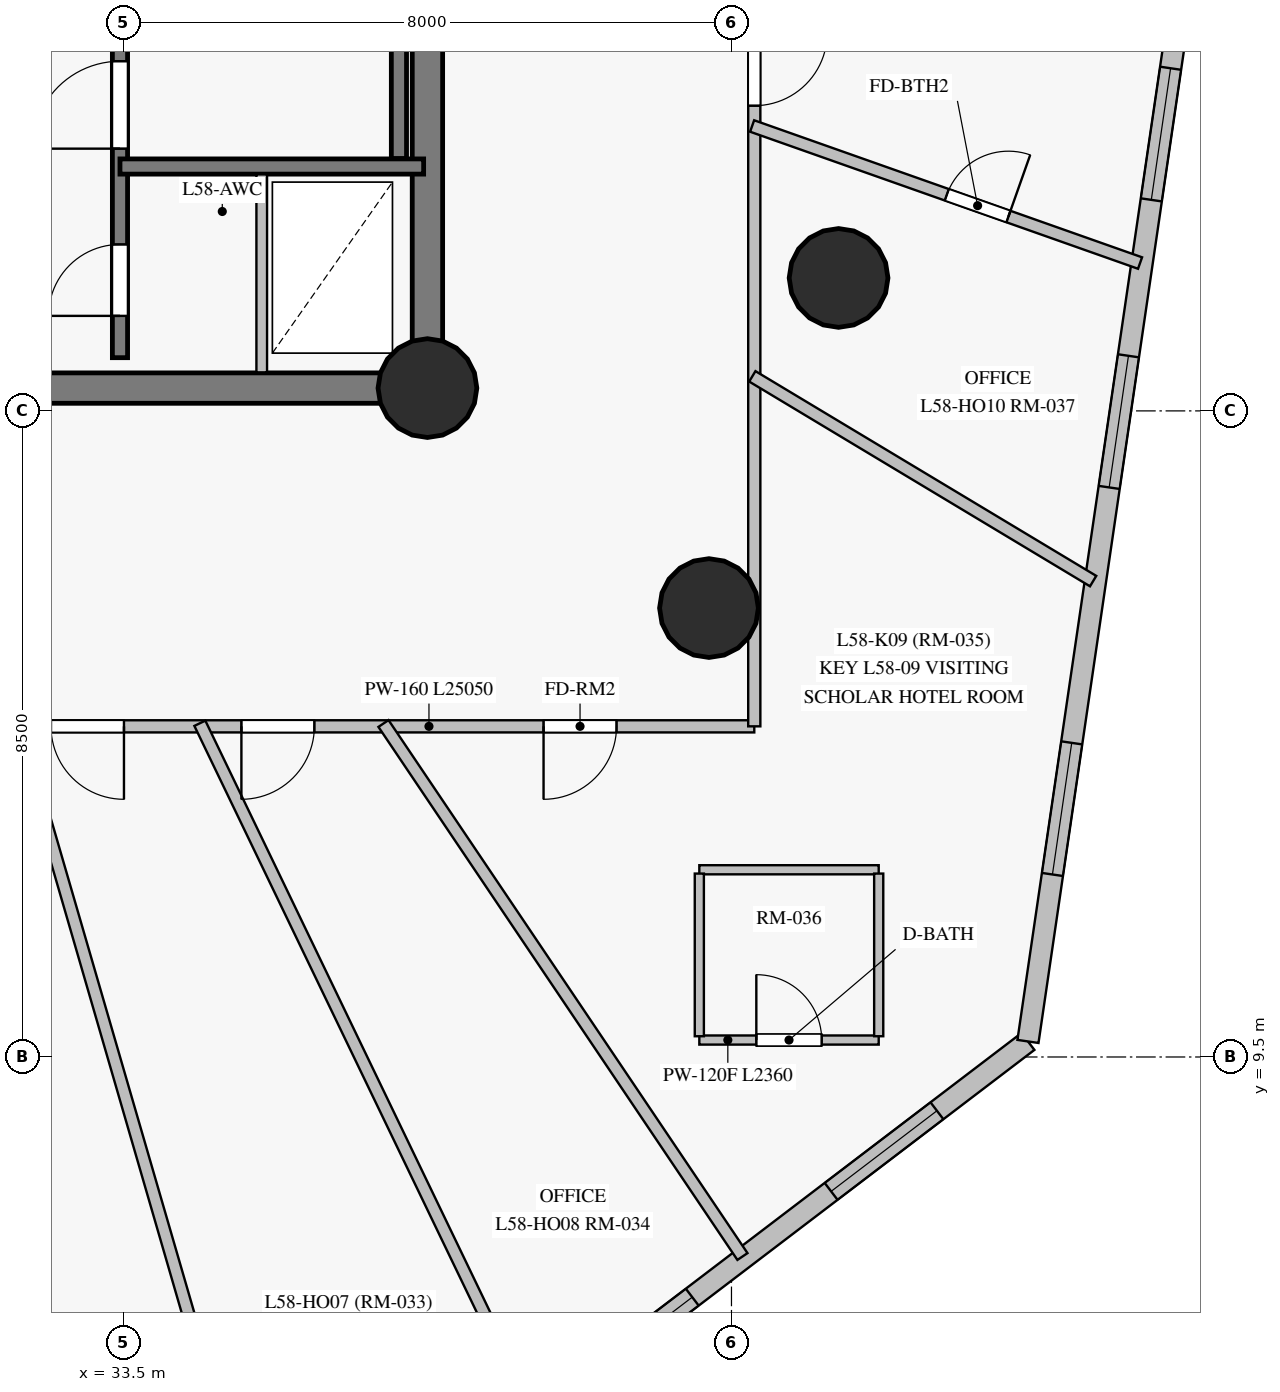
"""IFC4 building model, lengths in metres.
Left out: names, types, materials, properties, quantities, classifications, styles, units other than length and angle.
Written with IfcOpenShell. Run it as: python <this file> out.ifc"""

import sys

from ifc_helpers import new_model, si_unit, direction, frame, frame_2d, origin, origin_with_axes, origin_2d, place, context, subcontext, project, spatial, rectangle, circle, extrude, source, transform, mapped, element, fill, save


model = new_model("IFC4")
c1 = context("Model", 3, precision=1e-05, world=origin(), true_north=direction((0.0, 1.0)))
c2 = subcontext(c1, "Body", "Model", "MODEL_VIEW")
j1 = project(units=[si_unit("LENGTHUNIT", "METRE"), si_unit("PLANEANGLEUNIT", "RADIAN")], contexts=[c1])
p1 = place(None, origin())
s1 = spatial("IfcSite", under=j1, at=p1, CompositionType="ELEMENT")
p2 = place(p1, origin())
s2 = spatial("IfcBuilding", under=s1, at=p2, CompositionType="ELEMENT")
p3 = place(p2, frame((0.0, 0.0, 199.25)))
s3 = spatial("IfcBuildingStorey", under=s2, at=p3, CompositionType="ELEMENT", Elevation=199.25)
p4 = place(p3, frame((26.55, 18.3, 0.0), z_axis=(0.0, 0.0, 1.0), x_axis=(1.0, 0.0, 0.0)))
e1 = element("IfcWall", 1, at=p4, inside=s3, PredefinedType="SHEAR", context=c2, shape_type="SweptSolid", body=[
    extrude(rectangle(XDim=10.95, YDim=0.4, at=frame_2d((5.475, 0.0))), origin(), (0.0, 0.0, 1.0), 2.825),
])
p5 = place(p4, frame((4.55, 0.0, 0.0)))
e2 = element("IfcOpeningElement", 2, at=p5, cuts=e1, PredefinedType="OPENING", context=c2, shape_type="SweptSolid", body=[
    extrude(rectangle(XDim=1.4, YDim=2.2, at=frame_2d((0.7, 1.1))), frame((0.0, 0.21, 0.0), z_axis=(0.0, -1.0, 0.0), x_axis=(1.0, 0.0, 0.0)), (0.0, 0.0, 1.0), 0.42),
])
p6 = place(p3, frame((37.5, 18.3, 0.0), z_axis=(0.0, 0.0, 1.0), x_axis=(0.0, 1.0, 0.0)))
e3 = element("IfcWall", 3, at=p6, inside=s3, PredefinedType="SHEAR", context=c2, shape_type="SweptSolid", body=[
    extrude(rectangle(XDim=16.4, YDim=0.4, at=frame_2d((8.2, 0.0))), origin(), (0.0, 0.0, 1.0), 2.825),
])
p7 = place(p6, frame((13.85, 0.0, 0.0)))
e4 = element("IfcOpeningElement", 4, at=p7, cuts=e3, PredefinedType="OPENING", context=c2, shape_type="SweptSolid", body=[
    extrude(rectangle(XDim=1.2, YDim=2.15, at=frame_2d((0.6, 1.075))), frame((0.0, 0.21, 0.0), z_axis=(0.0, -1.0, 0.0), x_axis=(1.0, 0.0, 0.0)), (0.0, 0.0, 1.0), 0.42),
])
m1 = source(origin_with_axes(), c2, "Body", "SweptSolid", [
    extrude(circle(Radius=0.65, at=origin_2d()), origin(), (0.0, 0.0, 1.0), 3.05),
])
for number, where, z_axis, x_axis in (
    (5, (37.5, 18.3, 0.0), (0.0, 0.0, 1.0), (1.0, 0.0, 0.0)),
    (6, (42.909, 19.749, 0.0), (0.0, 0.0, 1.0), (1.0, 0.0, 0.0)),
    (7, (41.204, 15.406, 0.0), (0.0, 0.0, 1.0), (1.0, 0.0, 0.0)),
):
    element("IfcColumn", number, at=place(p3, frame(where, z_axis=z_axis, x_axis=x_axis)), inside=s3, PredefinedType="COLUMN", context=c2, shape_type="MappedRepresentation", body=[
        mapped(m1, transform((0.0, 0.0, 0.0), scale=1.0)),
    ])
p8 = place(p3, frame((37.403, 3.613, 0.0), z_axis=(0.0, 0.0, 1.0), x_axis=(0.795510317951, 0.605940041616, 0.0)))
e8 = element("IfcWall", 8, at=p8, inside=s3, PredefinedType="SOLIDWALL", context=c2, shape_type="SweptSolid", body=[
    extrude(rectangle(XDim=10.053, YDim=0.28, at=frame_2d((5.026, 0.0))), origin(), (0.0, 0.0, 1.0), 2.825),
])
p9 = place(p8, frame((0.505, 0.0, 0.85)))
e9 = element("IfcOpeningElement", 9, at=p9, cuts=e8, PredefinedType="OPENING", context=c2, shape_type="SweptSolid", body=[
    extrude(rectangle(XDim=0.95, YDim=1.5, at=frame_2d((0.475, 0.75))), frame((0.0, 0.15, 0.0), z_axis=(0.0, -1.0, 0.0), x_axis=(1.0, 0.0, 0.0)), (0.0, 0.0, 1.0), 0.3),
])
p10 = place(p8, frame((2.751, 0.0, 0.85)))
e10 = element("IfcOpeningElement", 10, at=p10, cuts=e8, PredefinedType="OPENING", context=c2, shape_type="SweptSolid", body=[
    extrude(rectangle(XDim=1.75, YDim=1.65, at=frame_2d((0.875, 0.825))), frame((0.0, 0.15, 0.0), z_axis=(0.0, -1.0, 0.0), x_axis=(1.0, 0.0, 0.0)), (0.0, 0.0, 1.0), 0.3),
])
p11 = place(p8, frame((6.798, 0.0, 0.85)))
e11 = element("IfcOpeningElement", 11, at=p11, cuts=e8, PredefinedType="OPENING", context=c2, shape_type="SweptSolid", body=[
    extrude(rectangle(XDim=1.75, YDim=1.65, at=frame_2d((0.875, 0.825))), frame((0.0, 0.15, 0.0), z_axis=(0.0, -1.0, 0.0), x_axis=(1.0, 0.0, 0.0)), (0.0, 0.0, 1.0), 0.3),
])
p12 = place(p3, frame((45.401, 9.705, 0.0), z_axis=(0.0, 0.0, 1.0), x_axis=(0.145019531455, 0.989428792535, 0.0)))
e12 = element("IfcWall", 12, at=p12, inside=s3, PredefinedType="SOLIDWALL", context=c2, shape_type="SweptSolid", body=[
    extrude(rectangle(XDim=13.837, YDim=0.28, at=frame_2d((6.918, 0.0))), origin(), (0.0, 0.0, 1.0), 2.825),
])
p13 = place(p12, frame((2.22, 0.0, 0.85)))
e13 = element("IfcOpeningElement", 13, at=p13, cuts=e12, PredefinedType="OPENING", context=c2, shape_type="SweptSolid", body=[
    extrude(rectangle(XDim=1.75, YDim=1.65, at=frame_2d((0.875, 0.825))), frame((0.0, 0.15, 0.0), z_axis=(0.0, -1.0, 0.0), x_axis=(1.0, 0.0, 0.0)), (0.0, 0.0, 1.0), 0.3),
])
p14 = place(p12, frame((7.366, 0.0, 0.85)))
e14 = element("IfcOpeningElement", 14, at=p14, cuts=e12, PredefinedType="OPENING", context=c2, shape_type="SweptSolid", body=[
    extrude(rectangle(XDim=1.75, YDim=1.65, at=frame_2d((0.875, 0.825))), frame((0.0, 0.15, 0.0), z_axis=(0.0, -1.0, 0.0), x_axis=(1.0, 0.0, 0.0)), (0.0, 0.0, 1.0), 0.3),
])
p15 = place(p12, frame((11.19, 0.0, 0.85)))
e15 = element("IfcOpeningElement", 15, at=p15, cuts=e12, PredefinedType="OPENING", context=c2, shape_type="SweptSolid", body=[
    extrude(rectangle(XDim=1.75, YDim=1.65, at=frame_2d((0.875, 0.825))), frame((0.0, 0.15, 0.0), z_axis=(0.0, -1.0, 0.0), x_axis=(1.0, 0.0, 0.0)), (0.0, 0.0, 1.0), 0.3),
])
p16 = place(p3, frame((33.455, 18.7, 0.0), z_axis=(0.0, 0.0, 1.0), x_axis=(0.0, 1.0, 0.0)))
e16 = element("IfcWall", 16, at=p16, inside=s3, PredefinedType="SHEAR", context=c2, shape_type="SweptSolid", body=[
    extrude(rectangle(XDim=15.6, YDim=0.2, at=frame_2d((7.8, 0.0))), origin(), (0.0, 0.0, 1.0), 2.825),
])
p17 = place(p16, frame((2.75, 0.0, 0.0)))
e17 = element("IfcOpeningElement", 17, at=p17, cuts=e16, PredefinedType="OPENING", context=c2, shape_type="SweptSolid", body=[
    extrude(rectangle(XDim=1.15, YDim=2.15, at=frame_2d((0.575, 1.075))), frame((0.0, 0.11, 0.0), z_axis=(0.0, -1.0, 0.0), x_axis=(1.0, 0.0, 0.0)), (0.0, 0.0, 1.0), 0.22),
])
p18 = place(p16, frame((0.55, 0.0, 0.0)))
e18 = element("IfcOpeningElement", 18, at=p18, cuts=e16, PredefinedType="OPENING", context=c2, shape_type="SweptSolid", body=[
    extrude(rectangle(XDim=0.94, YDim=2.1, at=frame_2d((0.47, 1.05))), frame((0.0, 0.11, 0.0), z_axis=(0.0, -1.0, 0.0), x_axis=(1.0, 0.0, 0.0)), (0.0, 0.0, 1.0), 0.22),
])
p19 = place(p3, frame((37.125, 21.32, 0.0), z_axis=(0.0, 0.0, 1.0), x_axis=(0.0, 1.0, 0.0)))
e19 = element("IfcWall", 19, at=p19, inside=s3, PredefinedType="SHEAR", context=c2, shape_type="SweptSolid", body=[
    extrude(rectangle(XDim=7.5, YDim=0.2, at=frame_2d((3.75, 0.0))), origin(), (0.0, 0.0, 1.0), 2.825),
])
p20 = place(p3, frame((33.455, 21.215, 0.0), z_axis=(0.0, 0.0, 1.0), x_axis=(1.0, 0.0, 0.0)))
e20 = element("IfcWall", 20, at=p20, inside=s3, PredefinedType="SHEAR", context=c2, shape_type="SweptSolid", body=[
    extrude(rectangle(XDim=3.995, YDim=0.2, at=frame_2d((1.998, 0.0))), origin(), (0.0, 0.0, 1.0), 2.825),
])
p21 = place(p3, frame((41.8, 13.85, 0.0), z_axis=(0.0, 0.0, 1.0), x_axis=(-1.0, 0.0, 0.0)))
e21 = element("IfcWall", 21, at=p21, inside=s3, PredefinedType="PARTITIONING", context=c2, shape_type="SweptSolid", body=[
    extrude(rectangle(XDim=25.05, YDim=0.16, at=frame_2d((12.525, 0.0))), origin(), (0.0, 0.0, 1.0), 2.275),
])
p22 = place(p21, frame((1.812, 0.0, 0.0)))
e22 = element("IfcOpeningElement", 22, at=p22, cuts=e21, PredefinedType="OPENING", context=c2, shape_type="SweptSolid", body=[
    extrude(rectangle(XDim=0.96, YDim=2.15, at=frame_2d((0.48, 1.075))), frame((0.0, 0.09, 0.0), z_axis=(0.0, -1.0, 0.0), x_axis=(1.0, 0.0, 0.0)), (0.0, 0.0, 1.0), 0.18),
])
p23 = place(p21, frame((21.761, 0.0, 0.0)))
e23 = element("IfcOpeningElement", 23, at=p23, cuts=e21, PredefinedType="OPENING", context=c2, shape_type="SweptSolid", body=[
    extrude(rectangle(XDim=0.96, YDim=2.15, at=frame_2d((0.48, 1.075))), frame((0.0, 0.09, 0.0), z_axis=(0.0, -1.0, 0.0), x_axis=(1.0, 0.0, 0.0)), (0.0, 0.0, 1.0), 0.18),
])
p24 = place(p21, frame((18.073, 0.0, 0.0)))
e24 = element("IfcOpeningElement", 24, at=p24, cuts=e21, PredefinedType="OPENING", context=c2, shape_type="SweptSolid", body=[
    extrude(rectangle(XDim=0.96, YDim=2.15, at=frame_2d((0.48, 1.075))), frame((0.0, 0.09, 0.0), z_axis=(0.0, -1.0, 0.0), x_axis=(1.0, 0.0, 0.0)), (0.0, 0.0, 1.0), 0.18),
])
p25 = place(p21, frame((15.718, 0.0, 0.0)))
e25 = element("IfcOpeningElement", 25, at=p25, cuts=e21, PredefinedType="OPENING", context=c2, shape_type="SweptSolid", body=[
    extrude(rectangle(XDim=0.96, YDim=2.15, at=frame_2d((0.48, 1.075))), frame((0.0, 0.09, 0.0), z_axis=(0.0, -1.0, 0.0), x_axis=(1.0, 0.0, 0.0)), (0.0, 0.0, 1.0), 0.18),
])
p26 = place(p21, frame((12.05, 0.0, 0.0)))
e26 = element("IfcOpeningElement", 26, at=p26, cuts=e21, PredefinedType="OPENING", context=c2, shape_type="SweptSolid", body=[
    extrude(rectangle(XDim=0.96, YDim=2.15, at=frame_2d((0.48, 1.075))), frame((0.0, 0.09, 0.0), z_axis=(0.0, -1.0, 0.0), x_axis=(1.0, 0.0, 0.0)), (0.0, 0.0, 1.0), 0.18),
])
p27 = place(p21, frame((8.292, 0.0, 0.0)))
e27 = element("IfcOpeningElement", 27, at=p27, cuts=e21, PredefinedType="OPENING", context=c2, shape_type="SweptSolid", body=[
    extrude(rectangle(XDim=0.96, YDim=2.15, at=frame_2d((0.48, 1.075))), frame((0.0, 0.09, 0.0), z_axis=(0.0, -1.0, 0.0), x_axis=(1.0, 0.0, 0.0)), (0.0, 0.0, 1.0), 0.18),
])
p28 = place(p21, frame((5.788, 0.0, 0.0)))
e28 = element("IfcOpeningElement", 28, at=p28, cuts=e21, PredefinedType="OPENING", context=c2, shape_type="SweptSolid", body=[
    extrude(rectangle(XDim=0.96, YDim=2.15, at=frame_2d((0.48, 1.075))), frame((0.0, 0.09, 0.0), z_axis=(0.0, -1.0, 0.0), x_axis=(1.0, 0.0, 0.0)), (0.0, 0.0, 1.0), 0.18),
])
p29 = place(p3, frame((41.8, 33.45, 0.0), z_axis=(0.0, 0.0, 1.0), x_axis=(0.0, -1.0, 0.0)))
e29 = element("IfcWall", 29, at=p29, inside=s3, PredefinedType="PARTITIONING", context=c2, shape_type="SweptSolid", body=[
    extrude(rectangle(XDim=19.6, YDim=0.16, at=frame_2d((9.8, 0.0))), origin(), (0.0, 0.0, 1.0), 2.275),
])
p30 = place(p29, frame((10.475, 0.0, 0.0)))
e30 = element("IfcOpeningElement", 30, at=p30, cuts=e29, PredefinedType="OPENING", context=c2, shape_type="SweptSolid", body=[
    extrude(rectangle(XDim=0.96, YDim=2.15, at=frame_2d((0.48, 1.075))), frame((0.0, 0.09, 0.0), z_axis=(0.0, -1.0, 0.0), x_axis=(1.0, 0.0, 0.0)), (0.0, 0.0, 1.0), 0.18),
])
p31 = place(p29, frame((9.325, 0.0, 0.0)))
e31 = element("IfcOpeningElement", 31, at=p31, cuts=e29, PredefinedType="OPENING", context=c2, shape_type="SweptSolid", body=[
    extrude(rectangle(XDim=0.96, YDim=2.15, at=frame_2d((0.48, 1.075))), frame((0.0, 0.09, 0.0), z_axis=(0.0, -1.0, 0.0), x_axis=(1.0, 0.0, 0.0)), (0.0, 0.0, 1.0), 0.18),
])
p32 = place(p29, frame((4.425, 0.0, 0.0)))
e32 = element("IfcOpeningElement", 32, at=p32, cuts=e29, PredefinedType="OPENING", context=c2, shape_type="SweptSolid", body=[
    extrude(rectangle(XDim=0.96, YDim=2.15, at=frame_2d((0.48, 1.075))), frame((0.0, 0.09, 0.0), z_axis=(0.0, -1.0, 0.0), x_axis=(1.0, 0.0, 0.0)), (0.0, 0.0, 1.0), 0.18),
])
p33 = place(p3, frame((32.098, 13.893, 0.0), z_axis=(0.0, 0.0, 1.0), x_axis=(0.278805425111, -0.960347611508, 0.0)))
e33 = element("IfcWall", 33, at=p33, inside=s3, PredefinedType="PARTITIONING", context=c2, shape_type="SweptSolid", body=[
    extrude(rectangle(XDim=10.659, YDim=0.16, at=frame_2d((5.33, 0.0))), origin(), (0.0, 0.0, 1.0), 2.825),
])
p34 = place(p3, frame((34.506, 13.89, 0.0), z_axis=(0.0, 0.0, 1.0), x_axis=(0.433903461871, -0.900959369659, 0.0)))
e34 = element("IfcWall", 34, at=p34, inside=s3, PredefinedType="PARTITIONING", context=c2, shape_type="SweptSolid", body=[
    extrude(rectangle(XDim=10.111, YDim=0.16, at=frame_2d((5.056, 0.0))), origin(), (0.0, 0.0, 1.0), 2.825),
])
p35 = place(p3, frame((36.922, 13.887, 0.0), z_axis=(0.0, 0.0, 1.0), x_axis=(0.558599163164, -0.829437746255, 0.0)))
e35 = element("IfcWall", 35, at=p35, inside=s3, PredefinedType="PARTITIONING", context=c2, shape_type="SweptSolid", body=[
    extrude(rectangle(XDim=8.454, YDim=0.16, at=frame_2d((4.227, 0.0))), origin(), (0.0, 0.0, 1.0), 2.825),
])
p36 = place(p3, frame((41.772, 21.748, 0.0), z_axis=(0.0, 0.0, 1.0), x_axis=(0.942903697414, -0.333065485156, 0.0)))
e36 = element("IfcWall", 36, at=p36, inside=s3, PredefinedType="PARTITIONING", context=c2, shape_type="SweptSolid", body=[
    extrude(rectangle(XDim=5.413, YDim=0.16, at=frame_2d((2.706, 0.0))), origin(), (0.0, 0.0, 1.0), 2.825),
])
p37 = place(p36, frame((2.716, 0.0, 0.0)))
e37 = element("IfcOpeningElement", 37, at=p37, cuts=e36, PredefinedType="OPENING", context=c2, shape_type="SweptSolid", body=[
    extrude(rectangle(XDim=0.86, YDim=2.04, at=frame_2d((0.43, 1.02))), frame((0.0, 0.09, 0.0), z_axis=(0.0, -1.0, 0.0), x_axis=(1.0, 0.0, 0.0)), (0.0, 0.0, 1.0), 0.18),
])
p38 = place(p3, frame((41.774, 18.455, 0.0), z_axis=(0.0, 0.0, 1.0), x_axis=(0.857183893401, -0.515010459014, 0.0)))
e38 = element("IfcWall", 38, at=p38, inside=s3, PredefinedType="PARTITIONING", context=c2, shape_type="SweptSolid", body=[
    extrude(rectangle(XDim=5.231, YDim=0.16, at=frame_2d((2.615, 0.0))), origin(), (0.0, 0.0, 1.0), 2.825),
])
p39 = place(p3, frame((41.077, 9.723, 0.0), z_axis=(0.0, 0.0, 1.0), x_axis=(1.0, 0.0, 0.0)))
e39 = element("IfcWall", 39, at=p39, inside=s3, PredefinedType="PARTITIONING", context=c2, shape_type="SweptSolid", body=[
    extrude(rectangle(XDim=2.36, YDim=0.12, at=frame_2d((1.18, 0.0))), origin(), (0.0, 0.0, 1.0), 2.825),
])
p40 = place(p39, frame((0.75, 0.0, 0.0)))
e40 = element("IfcOpeningElement", 40, at=p40, cuts=e39, PredefinedType="OPENING", context=c2, shape_type="SweptSolid", body=[
    extrude(rectangle(XDim=0.86, YDim=2.1, at=frame_2d((0.43, 1.05))), frame((0.0, 0.07, 0.0), z_axis=(0.0, -1.0, 0.0), x_axis=(1.0, 0.0, 0.0)), (0.0, 0.0, 1.0), 0.14),
])
p41 = place(p3, frame((43.437, 11.963, 0.0), z_axis=(0.0, 0.0, 1.0), x_axis=(-1.0, 0.0, 0.0)))
e41 = element("IfcWall", 41, at=p41, inside=s3, PredefinedType="PARTITIONING", context=c2, shape_type="SweptSolid", body=[
    extrude(rectangle(XDim=2.36, YDim=0.12, at=frame_2d((1.18, 0.0))), origin(), (0.0, 0.0, 1.0), 2.825),
])
p42 = place(p3, frame((35.32, 18.507, 0.0), z_axis=(0.0, 0.0, 1.0), x_axis=(0.0, 1.0, 0.0)))
e42 = element("IfcWall", 42, at=p42, inside=s3, PredefinedType="PARTITIONING", context=c2, shape_type="SweptSolid", body=[
    extrude(rectangle(XDim=2.604, YDim=0.14, at=frame_2d((1.302, 0.0))), origin(), (0.0, 0.0, 1.0), 2.825),
])
for number, where, z_axis, x_axis in (
    (43, (43.437, 9.773, 0.0), (0.0, 0.0, 1.0), (0.0, 1.0, 0.0)),
    (44, (41.077, 11.913, 0.0), (0.0, 0.0, 1.0), (0.0, -1.0, 0.0)),
):
    element("IfcWall", number, at=place(p3, frame(where, z_axis=z_axis, x_axis=x_axis)), inside=s3, PredefinedType="PARTITIONING", context=c2, shape_type="SweptSolid", body=[
        extrude(rectangle(XDim=2.14, YDim=0.12, at=frame_2d((1.07, 0.0))), origin(), (0.0, 0.0, 1.0), 2.825),
    ])
m2 = source(origin_with_axes(), c2, "Body", "SweptSolid", [
    extrude(rectangle(XDim=1.75, YDim=1.65, at=frame_2d((0.875, 0.825))), frame((0.0, 0.03, 0.0), z_axis=(0.0, -1.0, 0.0), x_axis=(1.0, 0.0, 0.0)), (0.0, 0.0, 1.0), 0.06),
])
p43 = place(p10, origin())
e45 = element("IfcWindow", 45, at=p43, inside=s3, PartitioningType="SINGLE_PANEL", PredefinedType="WINDOW", context=c2, shape_type="MappedRepresentation", body=[
    mapped(m2, transform((0.0, 0.0, 0.0), scale=1.0)),
])
fill(e10, e45)
p44 = place(p11, origin())
e46 = element("IfcWindow", 46, at=p44, inside=s3, PartitioningType="SINGLE_PANEL", PredefinedType="WINDOW", context=c2, shape_type="MappedRepresentation", body=[
    mapped(m2, transform((0.0, 0.0, 0.0), scale=1.0)),
])
fill(e11, e46)
p45 = place(p13, origin())
e47 = element("IfcWindow", 47, at=p45, inside=s3, PartitioningType="SINGLE_PANEL", PredefinedType="WINDOW", context=c2, shape_type="MappedRepresentation", body=[
    mapped(m2, transform((0.0, 0.0, 0.0), scale=1.0)),
])
fill(e13, e47)
p46 = place(p14, origin())
e48 = element("IfcWindow", 48, at=p46, inside=s3, PartitioningType="SINGLE_PANEL", PredefinedType="WINDOW", context=c2, shape_type="MappedRepresentation", body=[
    mapped(m2, transform((0.0, 0.0, 0.0), scale=1.0)),
])
fill(e14, e48)
p47 = place(p15, origin())
e49 = element("IfcWindow", 49, at=p47, inside=s3, PartitioningType="SINGLE_PANEL", PredefinedType="WINDOW", context=c2, shape_type="MappedRepresentation", body=[
    mapped(m2, transform((0.0, 0.0, 0.0), scale=1.0)),
])
fill(e15, e49)
m3 = source(origin_with_axes(), c2, "Body", "SweptSolid", [
    extrude(rectangle(XDim=1.15, YDim=2.15, at=frame_2d((0.575, 1.075))), frame((0.0, 0.025, 0.0), z_axis=(0.0, -1.0, 0.0), x_axis=(1.0, 0.0, 0.0)), (0.0, 0.0, 1.0), 0.05),
])
p48 = place(p17, origin())
e50 = element("IfcDoor", 50, at=p48, inside=s3, OperationType="SINGLE_SWING_LEFT", PredefinedType="DOOR", context=c2, shape_type="MappedRepresentation", body=[
    mapped(m3, transform((0.0, 0.0, 0.0), scale=1.0)),
])
fill(e17, e50)
m4 = source(origin_with_axes(), c2, "Body", "SweptSolid", [
    extrude(rectangle(XDim=0.94, YDim=2.1, at=frame_2d((0.47, 1.05))), frame((0.0, 0.025, 0.0), z_axis=(0.0, -1.0, 0.0), x_axis=(1.0, 0.0, 0.0)), (0.0, 0.0, 1.0), 0.05),
])
p49 = place(p18, origin())
e51 = element("IfcDoor", 51, at=p49, inside=s3, OperationType="SINGLE_SWING_LEFT", PredefinedType="DOOR", context=c2, shape_type="MappedRepresentation", body=[
    mapped(m4, transform((0.0, 0.0, 0.0), scale=1.0)),
])
fill(e18, e51)
m5 = source(origin_with_axes(), c2, "Body", "SweptSolid", [
    extrude(rectangle(XDim=0.86, YDim=2.1, at=frame_2d((0.43, 1.05))), frame((0.0, 0.025, 0.0), z_axis=(0.0, -1.0, 0.0), x_axis=(1.0, 0.0, 0.0)), (0.0, 0.0, 1.0), 0.05),
])
p50 = place(p40, origin())
e52 = element("IfcDoor", 52, at=p50, inside=s3, OperationType="SINGLE_SWING_LEFT", PredefinedType="DOOR", context=c2, shape_type="MappedRepresentation", body=[
    mapped(m5, transform((0.0, 0.0, 0.0), scale=1.0)),
])
fill(e40, e52)
m6 = source(origin_with_axes(), c2, "Body", "SweptSolid", [
    extrude(rectangle(XDim=0.96, YDim=2.15, at=frame_2d((0.48, 1.075))), frame((0.0, 0.025, 0.0), z_axis=(0.0, -1.0, 0.0), x_axis=(1.0, 0.0, 0.0)), (0.0, 0.0, 1.0), 0.05),
])
p51 = place(p22, origin())
e53 = element("IfcDoor", 53, at=p51, inside=s3, OperationType="SINGLE_SWING_RIGHT", PredefinedType="DOOR", context=c2, shape_type="MappedRepresentation", body=[
    mapped(m6, transform((0.0, 0.0, 0.0), scale=1.0)),
])
fill(e22, e53)
p52 = place(p27, origin())
e54 = element("IfcDoor", 54, at=p52, inside=s3, OperationType="SINGLE_SWING_LEFT", PredefinedType="DOOR", context=c2, shape_type="MappedRepresentation", body=[
    mapped(m6, transform((0.0, 0.0, 0.0), scale=1.0)),
])
fill(e27, e54)
p53 = place(p28, origin())
e55 = element("IfcDoor", 55, at=p53, inside=s3, OperationType="SINGLE_SWING_RIGHT", PredefinedType="DOOR", context=c2, shape_type="MappedRepresentation", body=[
    mapped(m6, transform((0.0, 0.0, 0.0), scale=1.0)),
])
fill(e28, e55)
p54 = place(p30, origin())
e56 = element("IfcDoor", 56, at=p54, inside=s3, OperationType="SINGLE_SWING_LEFT", PredefinedType="DOOR", context=c2, shape_type="MappedRepresentation", body=[
    mapped(m6, transform((0.0, 0.0, 0.0), scale=1.0)),
])
fill(e30, e56)
m7 = source(origin_with_axes(), c2, "Body", "SweptSolid", [
    extrude(rectangle(XDim=0.86, YDim=2.04, at=frame_2d((0.43, 1.02))), frame((0.0, 0.025, 0.0), z_axis=(0.0, -1.0, 0.0), x_axis=(1.0, 0.0, 0.0)), (0.0, 0.0, 1.0), 0.05),
])
p55 = place(p37, origin())
e57 = element("IfcDoor", 57, at=p55, inside=s3, OperationType="SINGLE_SWING_RIGHT", PredefinedType="DOOR", context=c2, shape_type="MappedRepresentation", body=[
    mapped(m7, transform((0.0, 0.0, 0.0), scale=1.0)),
])
fill(e37, e57)
save(model, sys.argv[1])
